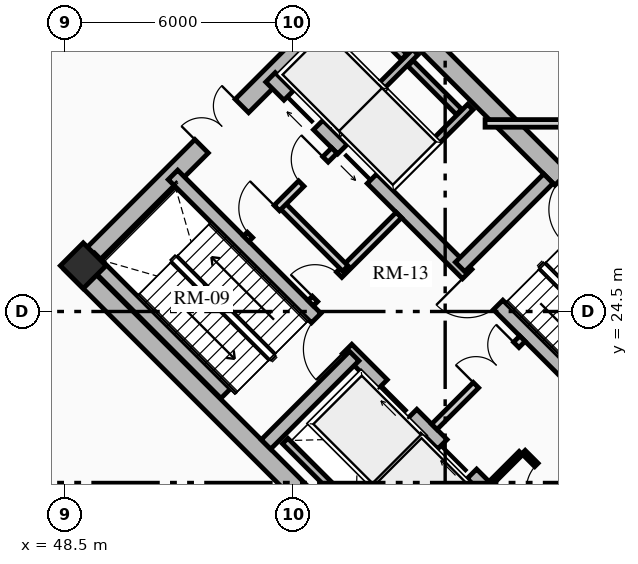
"""IFC4 building model, lengths in metres.
Left out: names, types, materials, properties, quantities, classifications, styles, units other than length and angle.
Written with IfcOpenShell. Run it as: python <this file> out.ifc"""

import sys

from ifc_helpers import new_model, si_unit, direction, frame, frame_2d, origin, origin_2d, place, context, subcontext, project, spatial, rectangle, extrude, source, transform, mapped, element, fill, save


model = new_model("IFC4")
c1 = context("Model", 3, precision=1e-05, world=origin(), true_north=direction((0.0, 1.0)))
c2 = subcontext(c1, "Body", "Model", "MODEL_VIEW")
j1 = project(units=[si_unit("LENGTHUNIT", "METRE"), si_unit("PLANEANGLEUNIT", "RADIAN")], contexts=[c1])
p1 = place(None, origin())
s1 = spatial("IfcSite", under=j1, at=p1, CompositionType="ELEMENT")
p2 = place(p1, origin())
s2 = spatial("IfcBuilding", under=s1, at=p2, CompositionType="ELEMENT")
p3 = place(p2, origin())
s3 = spatial("IfcBuildingStorey", under=s2, at=p3, CompositionType="ELEMENT", Elevation=0.0)
p4 = place(p3, frame((58.773, 15.661, 0.0), z_axis=(0.0, 0.0, 1.0), x_axis=(-0.707106781187, 0.707106781187, 0.0)))
e1 = element("IfcWall", 1, at=p4, inside=s3, PredefinedType="SHEAR", context=c2, shape_type="SweptSolid", body=[
    extrude(rectangle(XDim=14.3, YDim=0.5, at=frame_2d((7.15, 0.0))), origin(), (0.0, 0.0, 1.0), 4.8),
])
p5 = place(p3, frame((66.339, 23.227, 0.0), z_axis=(0.0, 0.0, 1.0), x_axis=(-0.707106781187, 0.707106781187, 0.0)))
e2 = element("IfcWall", 2, at=p5, inside=s3, PredefinedType="SHEAR", context=c2, shape_type="SweptSolid", body=[
    extrude(rectangle(XDim=14.3, YDim=0.5, at=frame_2d((7.15, 0.0))), origin(), (0.0, 0.0, 1.0), 4.8),
])
m1 = source(origin(), c2, "Body", "SweptSolid", [
    extrude(rectangle(XDim=1.15, YDim=2.02, at=frame_2d((0.575, 1.01))), frame((0.0, 0.26, 0.0), z_axis=(0.0, -1.0, 0.0), x_axis=(1.0, 0.0, 0.0)), (0.0, 0.0, 1.0), 0.52),
])
p6 = place(p5, frame((5.6, 0.0, 0.0)))
e3 = element("IfcOpeningElement", 3, at=p6, cuts=e2, PredefinedType="OPENING", context=c2, shape_type="MappedRepresentation", body=[
    mapped(m1, transform((0.0, 0.0, 0.0), x_axis=(1.0, 0.0, 0.0), y_axis=(0.0, 1.0, 0.0), z_axis=(0.0, 0.0, 1.0), scale=1.0)),
])
p7 = place(p3, frame((58.596, 15.838, 0.0), z_axis=(0.0, 0.0, 1.0), x_axis=(0.707106781187, 0.707106781187, 0.0)))
e4 = element("IfcWall", 4, at=p7, inside=s3, PredefinedType="SHEAR", context=c2, shape_type="SweptSolid", body=[
    extrude(rectangle(XDim=10.7, YDim=0.5, at=frame_2d((5.35, 0.0))), origin(), (0.0, 0.0, 1.0), 4.8),
])
m2 = source(origin(), c2, "Body", "SweptSolid", [
    extrude(rectangle(XDim=1.5, YDim=2.02, at=frame_2d((0.75, 1.01))), frame((0.0, 0.26, 0.0), z_axis=(0.0, -1.0, 0.0), x_axis=(1.0, 0.0, 0.0)), (0.0, 0.0, 1.0), 0.52),
])
p8 = place(p7, frame((5.45, 0.0, 0.0)))
e5 = element("IfcOpeningElement", 5, at=p8, cuts=e4, PredefinedType="OPENING", context=c2, shape_type="MappedRepresentation", body=[
    mapped(m2, transform((0.0, 0.0, 0.0), x_axis=(1.0, 0.0, 0.0), y_axis=(0.0, 1.0, 0.0), z_axis=(0.0, 0.0, 1.0), scale=1.0)),
])
p9 = place(p3, frame((48.838, 25.596, 0.0), z_axis=(0.0, 0.0, 1.0), x_axis=(0.707106781187, 0.707106781187, 0.0)))
e6 = element("IfcWall", 6, at=p9, inside=s3, PredefinedType="SHEAR", context=c2, shape_type="SweptSolid", body=[
    extrude(rectangle(XDim=10.7, YDim=0.5, at=frame_2d((5.35, 0.0))), origin(), (0.0, 0.0, 1.0), 4.8),
])
p10 = place(p9, frame((4.6, 0.0, 0.0)))
e7 = element("IfcOpeningElement", 7, at=p10, cuts=e6, PredefinedType="OPENING", context=c2, shape_type="MappedRepresentation", body=[
    mapped(m2, transform((0.0, 0.0, 0.0), x_axis=(1.0, 0.0, 0.0), y_axis=(0.0, 1.0, 0.0), z_axis=(0.0, 0.0, 1.0), scale=1.0)),
])
p11 = place(p3, frame((61.096, 18.338, 0.0), z_axis=(0.0, 0.0, 1.0), x_axis=(-0.707106781187, 0.707106781187, 0.0)))
e8 = element("IfcWall", 8, at=p11, inside=s3, PredefinedType="SHEAR", context=c2, shape_type="SweptSolid", body=[
    extrude(rectangle(XDim=13.8, YDim=0.35, at=frame_2d((6.9, 0.0))), origin(), (0.0, 0.0, 1.0), 4.8),
])
m3 = source(origin(), c2, "Body", "SweptSolid", [
    extrude(rectangle(XDim=1.1, YDim=2.015, at=frame_2d((0.55, 1.007))), frame((0.0, 0.185, 0.0), z_axis=(0.0, -1.0, 0.0), x_axis=(1.0, 0.0, 0.0)), (0.0, 0.0, 1.0), 0.37),
])
p12 = place(p11, frame((4.9, 0.0, 0.0)))
e9 = element("IfcOpeningElement", 9, at=p12, cuts=e8, PredefinedType="OPENING", context=c2, shape_type="MappedRepresentation", body=[
    mapped(m3, transform((0.0, 0.0, 0.0), x_axis=(1.0, 0.0, 0.0), y_axis=(0.0, 1.0, 0.0), z_axis=(0.0, 0.0, 1.0), scale=1.0)),
])
p13 = place(p11, frame((0.675, 0.0, 0.0)))
e10 = element("IfcOpeningElement", 10, at=p13, cuts=e8, PredefinedType="OPENING", context=c2, shape_type="MappedRepresentation", body=[
    mapped(m3, transform((0.0, 0.0, 0.0), x_axis=(1.0, 0.0, 0.0), y_axis=(0.0, 1.0, 0.0), z_axis=(0.0, 0.0, 1.0), scale=1.0)),
])
p14 = place(p11, frame((2.675, 0.0, 0.0)))
e11 = element("IfcOpeningElement", 11, at=p14, cuts=e8, PredefinedType="OPENING", context=c2, shape_type="MappedRepresentation", body=[
    mapped(m3, transform((0.0, 0.0, 0.0), x_axis=(1.0, 0.0, 0.0), y_axis=(0.0, 1.0, 0.0), z_axis=(0.0, 0.0, 1.0), scale=1.0)),
])
m4 = source(origin(), c2, "Body", "SweptSolid", [
    extrude(rectangle(XDim=1.15, YDim=2.02, at=frame_2d((0.575, 1.01))), frame((0.0, 0.185, 0.0), z_axis=(0.0, -1.0, 0.0), x_axis=(1.0, 0.0, 0.0)), (0.0, 0.0, 1.0), 0.37),
])
p15 = place(p11, frame((7.32, 0.0, 0.0)))
e12 = element("IfcOpeningElement", 12, at=p15, cuts=e8, PredefinedType="OPENING", context=c2, shape_type="MappedRepresentation", body=[
    mapped(m4, transform((0.0, 0.0, 0.0), x_axis=(1.0, 0.0, 0.0), y_axis=(0.0, 1.0, 0.0), z_axis=(0.0, 0.0, 1.0), scale=1.0)),
])
p16 = place(p3, frame((63.662, 20.904, 0.0), z_axis=(0.0, 0.0, 1.0), x_axis=(-0.707106781187, 0.707106781187, 0.0)))
e13 = element("IfcWall", 13, at=p16, inside=s3, PredefinedType="SHEAR", context=c2, shape_type="SweptSolid", body=[
    extrude(rectangle(XDim=13.8, YDim=0.35, at=frame_2d((6.9, 0.0))), origin(), (0.0, 0.0, 1.0), 4.8),
])
p17 = place(p16, frame((10.025, 0.0, 0.0)))
e14 = element("IfcOpeningElement", 14, at=p17, cuts=e13, PredefinedType="OPENING", context=c2, shape_type="MappedRepresentation", body=[
    mapped(m3, transform((0.0, 0.0, 0.0), x_axis=(1.0, 0.0, 0.0), y_axis=(0.0, 1.0, 0.0), z_axis=(0.0, 0.0, 1.0), scale=1.0)),
])
p18 = place(p16, frame((12.025, 0.0, 0.0)))
e15 = element("IfcOpeningElement", 15, at=p18, cuts=e13, PredefinedType="OPENING", context=c2, shape_type="MappedRepresentation", body=[
    mapped(m3, transform((0.0, 0.0, 0.0), x_axis=(1.0, 0.0, 0.0), y_axis=(0.0, 1.0, 0.0), z_axis=(0.0, 0.0, 1.0), scale=1.0)),
])
p19 = place(p16, frame((5.33, 0.0, 0.0)))
e16 = element("IfcOpeningElement", 16, at=p19, cuts=e13, PredefinedType="OPENING", context=c2, shape_type="MappedRepresentation", body=[
    mapped(m4, transform((0.0, 0.0, 0.0), x_axis=(1.0, 0.0, 0.0), y_axis=(0.0, 1.0, 0.0), z_axis=(0.0, 0.0, 1.0), scale=1.0)),
])
p20 = place(p3, frame((52.723, 22.34, 0.0), z_axis=(0.0, 0.0, 1.0), x_axis=(-0.707106781187, 0.707106781187, 0.0)))
e17 = element("IfcWall", 17, at=p20, inside=s3, PredefinedType="SHEAR", context=c2, shape_type="SweptSolid", body=[
    extrude(rectangle(XDim=5.05, YDim=0.35, at=frame_2d((2.525, 0.0))), origin(), (0.0, 0.0, 1.0), 4.8),
])
for number, where, z_axis, x_axis in (
    (18, (53.784, 21.003, 0.0), (0.0, 0.0, 1.0), (0.707, 0.707, 0.0)),
    (19, (58.893, 25.674, 0.0), (0.0, 0.0, 1.0), (0.707, 0.707, 0.0)),
):
    element("IfcWall", number, at=place(p3, frame(where, z_axis=z_axis, x_axis=x_axis)), inside=s3, PredefinedType="SHEAR", context=c2, shape_type="SweptSolid", body=[
        extrude(rectangle(XDim=3.285, YDim=0.35, at=frame_2d((1.643, 0.0))), origin(), (0.0, 0.0, 1.0), 4.8),
    ])
p21 = place(p3, frame((48.976, 25.706, 0.0), z_axis=(0.0, 0.0, 1.0), x_axis=(0.707106781187, 0.707106781187, 0.0)))
e20 = element("IfcColumn", 20, at=p21, inside=s3, PredefinedType="COLUMN", context=c2, shape_type="SweptSolid", body=[
    extrude(rectangle(XDim=0.85, YDim=0.85, at=origin_2d()), origin(), (0.0, 0.0, 1.0), 4.8),
])
p22 = place(p3, frame((55.888, 19.069, 0.0), z_axis=(0.0, 0.0, 1.0), x_axis=(0.707106781187, 0.707106781187, 0.0)))
e21 = element("IfcWall", 21, at=p22, inside=s3, PredefinedType="SHEAR", context=c2, shape_type="SweptSolid", body=[
    extrude(rectangle(XDim=2.97, YDim=0.2, at=frame_2d((1.485, 0.0))), origin(), (0.0, 0.0, 1.0), 4.8),
])
p23 = place(p3, frame((56.015, 19.366, 0.0), z_axis=(0.0, 0.0, 1.0), x_axis=(-0.707106781187, 0.707106781187, 0.0)))
e22 = element("IfcWall", 22, at=p23, inside=s3, PredefinedType="SHEAR", context=c2, shape_type="SweptSolid", body=[
    extrude(rectangle(XDim=2.44, YDim=0.2, at=frame_2d((1.22, 0.0))), origin(), (0.0, 0.0, 1.0), 4.8),
])
p24 = place(p3, frame((57.062, 27.781, 0.0), z_axis=(0.0, 0.0, 1.0), x_axis=(0.707106781187, 0.707106781187, 0.0)))
e23 = element("IfcWall", 23, at=p24, inside=s3, PredefinedType="SHEAR", context=c2, shape_type="SweptSolid", body=[
    extrude(rectangle(XDim=2.97, YDim=0.2, at=frame_2d((1.485, 0.0))), origin(), (0.0, 0.0, 1.0), 4.8),
])
p25 = place(p3, frame((55.615, 29.227, 0.0), z_axis=(0.0, 0.0, 1.0), x_axis=(0.707147878904, 0.70706568108, 0.0)))
e24 = element("IfcWall", 24, at=p25, inside=s3, PredefinedType="SHEAR", context=c2, shape_type="SweptSolid", body=[
    extrude(rectangle(XDim=2.97, YDim=0.2, at=frame_2d((1.485, 0.0))), origin(), (0.0, 0.0, 1.0), 4.8),
])
p26 = place(p3, frame((58.865, 29.754, 0.0), z_axis=(0.0, 0.0, 1.0), x_axis=(-0.707174411312, 0.707039144592, 0.0)))
e25 = element("IfcWall", 25, at=p26, inside=s3, PredefinedType="SHEAR", context=c2, shape_type="SweptSolid", body=[
    extrude(rectangle(XDim=1.805, YDim=0.2, at=frame_2d((0.902, 0.0))), origin(), (0.0, 0.0, 1.0), 4.8),
])
p27 = place(p3, frame((57.419, 31.2, 0.0), z_axis=(0.0, 0.0, 1.0), x_axis=(-0.707032117043, 0.707181437447, 0.0)))
e26 = element("IfcWall", 26, at=p27, inside=s3, PredefinedType="SHEAR", context=c2, shape_type="SweptSolid", body=[
    extrude(rectangle(XDim=1.635, YDim=0.2, at=frame_2d((0.817, 0.0))), origin(), (0.0, 0.0, 1.0), 4.8),
])
p28 = place(p3, frame((58.214, 21.467, 0.0), z_axis=(0.0, 0.0, 1.0), x_axis=(0.707106781187, 0.707106781187, 0.0)))
e27 = element("IfcWall", 27, at=p28, inside=s3, PredefinedType="PARTITIONING", context=c2, shape_type="SweptSolid", body=[
    extrude(rectangle(XDim=3.28, YDim=0.2, at=frame_2d((1.64, 0.0))), origin(), (0.0, 0.0, 1.0), 4.485),
])
m5 = source(origin(), c2, "Body", "SweptSolid", [
    extrude(rectangle(XDim=1.5, YDim=2.02, at=frame_2d((0.75, 1.01))), frame((0.0, 0.11, 0.0), z_axis=(0.0, -1.0, 0.0), x_axis=(1.0, 0.0, 0.0)), (0.0, 0.0, 1.0), 0.22),
])
p29 = place(p28, frame((1.55, 0.0, 0.0)))
e28 = element("IfcOpeningElement", 28, at=p29, cuts=e27, PredefinedType="OPENING", context=c2, shape_type="MappedRepresentation", body=[
    mapped(m5, transform((0.0, 0.0, 0.0), x_axis=(1.0, 0.0, 0.0), y_axis=(0.0, 1.0, 0.0), z_axis=(0.0, 0.0, 1.0), scale=1.0)),
])
p30 = place(p3, frame((54.961, 24.719, 0.0), z_axis=(0.0, 0.0, 1.0), x_axis=(0.707106781187, 0.707106781187, 0.0)))
e29 = element("IfcWall", 29, at=p30, inside=s3, PredefinedType="PARTITIONING", context=c2, shape_type="SweptSolid", body=[
    extrude(rectangle(XDim=3.28, YDim=0.2, at=frame_2d((1.64, 0.0))), origin(), (0.0, 0.0, 1.0), 4.485),
])
m6 = source(origin(), c2, "Body", "SweptSolid", [
    extrude(rectangle(XDim=0.9, YDim=2.005, at=frame_2d((0.45, 1.002))), frame((0.0, 0.11, 0.0), z_axis=(0.0, -1.0, 0.0), x_axis=(1.0, 0.0, 0.0)), (0.0, 0.0, 1.0), 0.22),
])
p31 = place(p30, frame((0.16, 0.0, 0.0)))
e30 = element("IfcOpeningElement", 30, at=p31, cuts=e29, PredefinedType="OPENING", context=c2, shape_type="MappedRepresentation", body=[
    mapped(m6, transform((0.0, 0.0, 0.0), x_axis=(1.0, 0.0, 0.0), y_axis=(0.0, 1.0, 0.0), z_axis=(0.0, 0.0, 1.0), scale=1.0)),
])
p32 = place(p3, frame((55.874, 25.631, 0.0), z_axis=(0.0, 0.0, 1.0), x_axis=(-0.707157639372, 0.707055919343, 0.0)))
e31 = element("IfcWall", 31, at=p32, inside=s3, PredefinedType="PARTITIONING", context=c2, shape_type="SweptSolid", body=[
    extrude(rectangle(XDim=2.4, YDim=0.2, at=frame_2d((1.2, 0.0))), origin(), (0.0, 0.0, 1.0), 4.485),
])
p33 = place(p3, frame((53.264, 26.416, 0.0), z_axis=(0.0, 0.0, 1.0), x_axis=(0.707106781187, 0.707106781187, 0.0)))
e32 = element("IfcWall", 32, at=p33, inside=s3, PredefinedType="PARTITIONING", context=c2, shape_type="SweptSolid", body=[
    extrude(rectangle(XDim=3.28, YDim=0.2, at=frame_2d((1.64, 0.0))), origin(), (0.0, 0.0, 1.0), 4.485),
])
m7 = source(origin(), c2, "Body", "SweptSolid", [
    extrude(rectangle(XDim=1.0, YDim=2.015, at=frame_2d((0.5, 1.007))), frame((0.0, 0.11, 0.0), z_axis=(0.0, -1.0, 0.0), x_axis=(1.0, 0.0, 0.0)), (0.0, 0.0, 1.0), 0.22),
])
p34 = place(p33, frame((0.14, 0.0, 0.0)))
e33 = element("IfcOpeningElement", 33, at=p34, cuts=e32, PredefinedType="OPENING", context=c2, shape_type="MappedRepresentation", body=[
    mapped(m7, transform((0.0, 0.0, 0.0), x_axis=(1.0, 0.0, 0.0), y_axis=(0.0, 1.0, 0.0), z_axis=(0.0, 0.0, 1.0), scale=1.0)),
])
p35 = place(p33, frame((2.05, 0.0, 0.0)))
e34 = element("IfcOpeningElement", 34, at=p35, cuts=e32, PredefinedType="OPENING", context=c2, shape_type="MappedRepresentation", body=[
    mapped(m6, transform((0.0, 0.0, 0.0), x_axis=(1.0, 0.0, 0.0), y_axis=(0.0, 1.0, 0.0), z_axis=(0.0, 0.0, 1.0), scale=1.0)),
])
p36 = place(p3, frame((61.835, 19.529, 0.0), z_axis=(0.0, 0.0, 1.0), x_axis=(-0.707174592913, 0.707038962956, 0.0)))
e35 = element("IfcWall", 35, at=p36, inside=s3, PredefinedType="PARTITIONING", context=c2, shape_type="SweptSolid", body=[
    extrude(rectangle(XDim=1.8, YDim=0.125, at=frame_2d((0.9, 0.0))), origin(), (0.0, 0.0, 1.0), 4.485),
])
m8 = source(origin(), c2, "Body", "SweptSolid", [
    extrude(rectangle(XDim=0.9, YDim=2.005, at=frame_2d((0.45, 1.002))), frame((0.0, 0.073, 0.0), z_axis=(0.0, -1.0, 0.0), x_axis=(1.0, 0.0, 0.0)), (0.0, 0.0, 1.0), 0.145),
])
p37 = place(p36, frame((0.42, 0.0, 0.0)))
e36 = element("IfcOpeningElement", 36, at=p37, cuts=e35, PredefinedType="OPENING", context=c2, shape_type="MappedRepresentation", body=[
    mapped(m8, transform((0.0, 0.0, 0.0), x_axis=(1.0, 0.0, 0.0), y_axis=(0.0, 1.0, 0.0), z_axis=(0.0, 0.0, 1.0), scale=1.0)),
])
p38 = place(p3, frame((59.713, 19.996, 0.0), z_axis=(0.0, 0.0, 1.0), x_axis=(0.707217726, 0.706995818963, 0.0)))
e37 = element("IfcWall", 37, at=p38, inside=s3, PredefinedType="PARTITIONING", context=c2, shape_type="SweptSolid", body=[
    extrude(rectangle(XDim=1.1, YDim=0.125, at=frame_2d((0.55, 0.0))), origin(), (0.0, 0.0, 1.0), 4.485),
])
p39 = place(p3, frame((59.55, 29.45, 0.0), z_axis=(0.0, 0.0, 1.0), x_axis=(1.0, 0.0, 0.0)))
e38 = element("IfcWall", 38, at=p39, inside=s3, PredefinedType="PARTITIONING", context=c2, shape_type="SweptSolid", body=[
    extrude(rectangle(XDim=22.1, YDim=0.2, at=frame_2d((11.05, 0.0))), origin(), (0.0, 0.0, 1.0), 3.529),
])
m9 = source(origin(), c2, "Body", "SweptSolid", [
    extrude(rectangle(XDim=1.1, YDim=2.015, at=frame_2d((0.55, 1.007))), frame((0.0, 0.025, 0.0), z_axis=(0.0, -1.0, 0.0), x_axis=(1.0, 0.0, 0.0)), (0.0, 0.0, 1.0), 0.05),
])
p40 = place(p12, origin())
e39 = element("IfcDoor", 39, at=p40, inside=s3, OperationType="SLIDING_TO_RIGHT", PredefinedType="DOOR", context=c2, shape_type="MappedRepresentation", body=[
    mapped(m9, transform((0.0, 0.0, 0.0), x_axis=(1.0, 0.0, 0.0), y_axis=(0.0, 1.0, 0.0), z_axis=(0.0, 0.0, 1.0), scale=1.0)),
])
fill(e9, e39)
p41 = place(p14, origin())
e40 = element("IfcDoor", 40, at=p41, inside=s3, OperationType="SLIDING_TO_RIGHT", PredefinedType="DOOR", context=c2, shape_type="MappedRepresentation", body=[
    mapped(m9, transform((0.0, 0.0, 0.0), x_axis=(1.0, 0.0, 0.0), y_axis=(0.0, 1.0, 0.0), z_axis=(0.0, 0.0, 1.0), scale=1.0)),
])
fill(e11, e40)
p42 = place(p17, origin())
e41 = element("IfcDoor", 41, at=p42, inside=s3, OperationType="SLIDING_TO_LEFT", PredefinedType="DOOR", context=c2, shape_type="MappedRepresentation", body=[
    mapped(m9, transform((0.0, 0.0, 0.0), x_axis=(1.0, 0.0, 0.0), y_axis=(0.0, 1.0, 0.0), z_axis=(0.0, 0.0, 1.0), scale=1.0)),
])
fill(e14, e41)
p43 = place(p18, origin())
e42 = element("IfcDoor", 42, at=p43, inside=s3, OperationType="SLIDING_TO_RIGHT", PredefinedType="DOOR", context=c2, shape_type="MappedRepresentation", body=[
    mapped(m9, transform((0.0, 0.0, 0.0), x_axis=(1.0, 0.0, 0.0), y_axis=(0.0, 1.0, 0.0), z_axis=(0.0, 0.0, 1.0), scale=1.0)),
])
fill(e15, e42)
m10 = source(origin(), c2, "Body", "SweptSolid", [
    extrude(rectangle(XDim=1.15, YDim=2.02, at=frame_2d((0.575, 1.01))), frame((0.0, 0.025, 0.0), z_axis=(0.0, -1.0, 0.0), x_axis=(1.0, 0.0, 0.0)), (0.0, 0.0, 1.0), 0.05),
])
p44 = place(p15, origin())
e43 = element("IfcDoor", 43, at=p44, inside=s3, OperationType="SINGLE_SWING_LEFT", PredefinedType="DOOR", context=c2, shape_type="MappedRepresentation", body=[
    mapped(m10, transform((0.0, 0.0, 0.0), x_axis=(1.0, 0.0, 0.0), y_axis=(0.0, 1.0, 0.0), z_axis=(0.0, 0.0, 1.0), scale=1.0)),
])
fill(e12, e43)
p45 = place(p19, origin())
e44 = element("IfcDoor", 44, at=p45, inside=s3, OperationType="SINGLE_SWING_RIGHT", PredefinedType="DOOR", context=c2, shape_type="MappedRepresentation", body=[
    mapped(m10, transform((0.0, 0.0, 0.0), x_axis=(1.0, 0.0, 0.0), y_axis=(0.0, 1.0, 0.0), z_axis=(0.0, 0.0, 1.0), scale=1.0)),
])
fill(e16, e44)
m11 = source(origin(), c2, "Body", "SweptSolid", [
    extrude(rectangle(XDim=1.5, YDim=2.02, at=frame_2d((0.75, 1.01))), frame((0.0, 0.025, 0.0), z_axis=(0.0, -1.0, 0.0), x_axis=(1.0, 0.0, 0.0)), (0.0, 0.0, 1.0), 0.05),
])
p46 = place(p10, origin())
e45 = element("IfcDoor", 45, at=p46, inside=s3, OperationType="DOUBLE_DOOR_SINGLE_SWING", PredefinedType="DOOR", context=c2, shape_type="MappedRepresentation", body=[
    mapped(m11, transform((0.0, 0.0, 0.0), x_axis=(1.0, 0.0, 0.0), y_axis=(0.0, 1.0, 0.0), z_axis=(0.0, 0.0, 1.0), scale=1.0)),
])
fill(e7, e45)
p47 = place(p29, origin())
e46 = element("IfcDoor", 46, at=p47, inside=s3, OperationType="DOUBLE_DOOR_SINGLE_SWING", PredefinedType="DOOR", context=c2, shape_type="MappedRepresentation", body=[
    mapped(m11, transform((0.0, 0.0, 0.0), x_axis=(1.0, 0.0, 0.0), y_axis=(0.0, 1.0, 0.0), z_axis=(0.0, 0.0, 1.0), scale=1.0)),
])
fill(e28, e46)
m12 = source(origin(), c2, "Body", "SweptSolid", [
    extrude(rectangle(XDim=0.9, YDim=2.005, at=frame_2d((0.45, 1.002))), frame((0.0, 0.025, 0.0), z_axis=(0.0, -1.0, 0.0), x_axis=(1.0, 0.0, 0.0)), (0.0, 0.0, 1.0), 0.05),
])
p48 = place(p31, origin())
e47 = element("IfcDoor", 47, at=p48, inside=s3, OperationType="SINGLE_SWING_LEFT", PredefinedType="DOOR", context=c2, shape_type="MappedRepresentation", body=[
    mapped(m12, transform((0.0, 0.0, 0.0), x_axis=(1.0, 0.0, 0.0), y_axis=(0.0, 1.0, 0.0), z_axis=(0.0, 0.0, 1.0), scale=1.0)),
])
fill(e30, e47)
m13 = source(origin(), c2, "Body", "SweptSolid", [
    extrude(rectangle(XDim=1.0, YDim=2.015, at=frame_2d((0.5, 1.007))), frame((0.0, 0.025, 0.0), z_axis=(0.0, -1.0, 0.0), x_axis=(1.0, 0.0, 0.0)), (0.0, 0.0, 1.0), 0.05),
])
p49 = place(p34, origin())
e48 = element("IfcDoor", 48, at=p49, inside=s3, OperationType="SINGLE_SWING_RIGHT", PredefinedType="DOOR", context=c2, shape_type="MappedRepresentation", body=[
    mapped(m13, transform((0.0, 0.0, 0.0), x_axis=(1.0, 0.0, 0.0), y_axis=(0.0, 1.0, 0.0), z_axis=(0.0, 0.0, 1.0), scale=1.0)),
])
fill(e33, e48)
p50 = place(p37, origin())
e49 = element("IfcDoor", 49, at=p50, inside=s3, OperationType="SINGLE_SWING_LEFT", PredefinedType="DOOR", context=c2, shape_type="MappedRepresentation", body=[
    mapped(m12, transform((0.0, 0.0, 0.0), x_axis=(1.0, 0.0, 0.0), y_axis=(0.0, 1.0, 0.0), z_axis=(0.0, 0.0, 1.0), scale=1.0)),
])
fill(e36, e49)
p51 = place(p35, origin())
e50 = element("IfcDoor", 50, at=p51, inside=s3, OperationType="SINGLE_SWING_RIGHT", PredefinedType="DOOR", context=c2, shape_type="MappedRepresentation", body=[
    mapped(m12, transform((0.0, 0.0, 0.0), x_axis=(1.0, 0.0, 0.0), y_axis=(0.0, 1.0, 0.0), z_axis=(0.0, 0.0, 1.0), scale=1.0)),
])
fill(e34, e50)
save(model, sys.argv[1])
